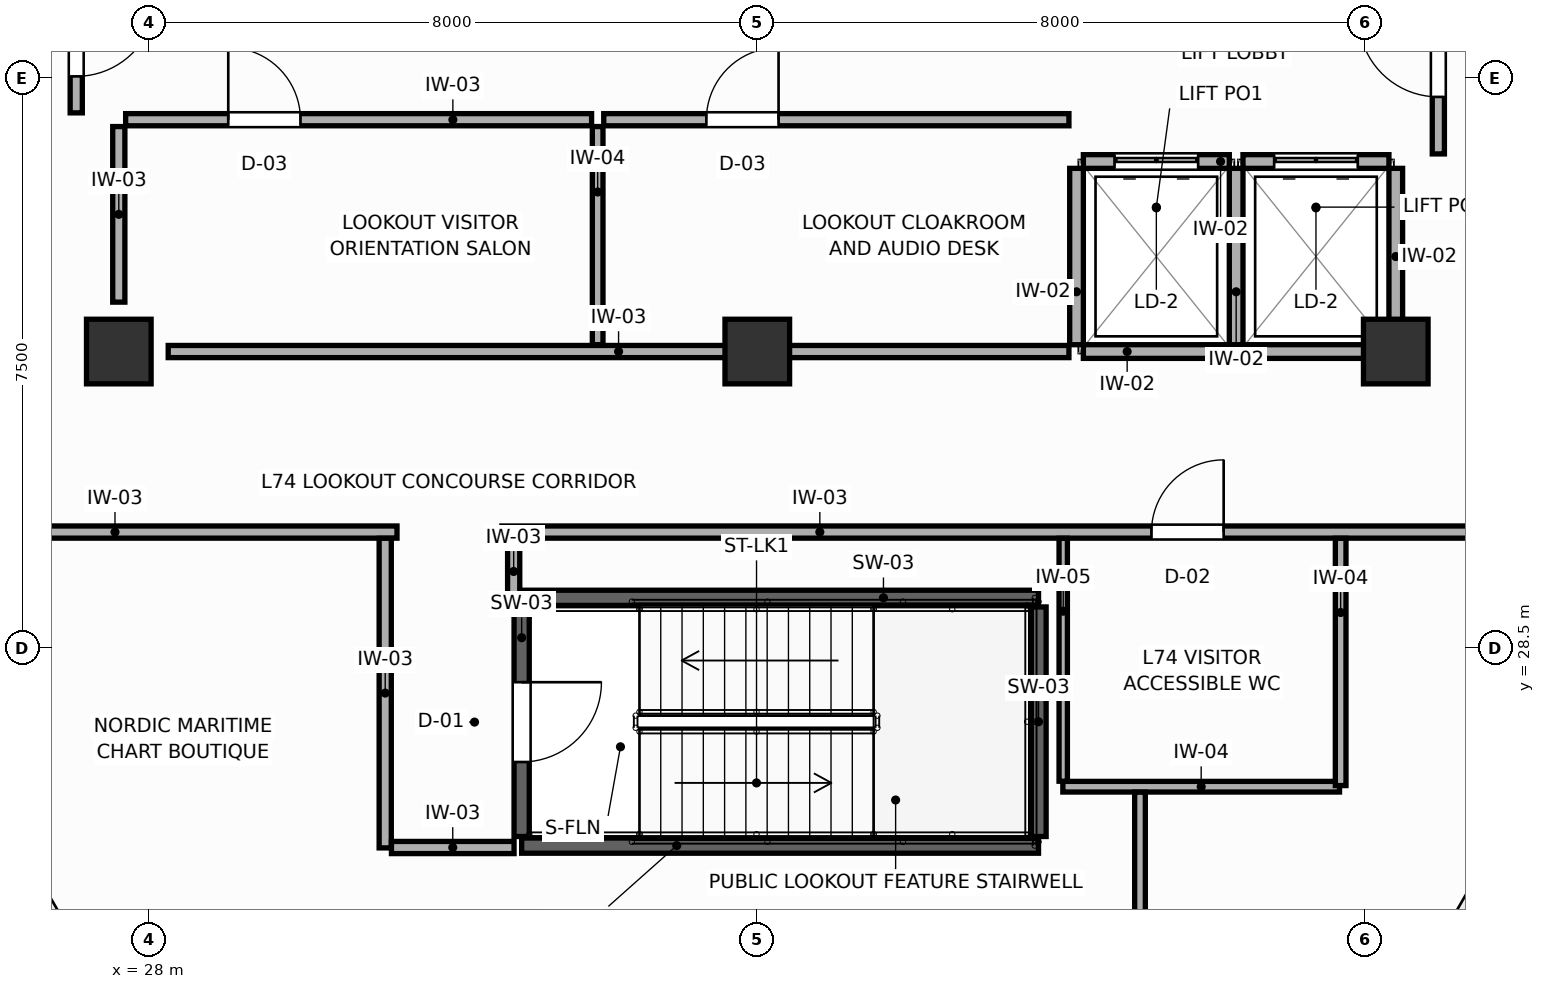
"""IFC4 building model, lengths in metres.
Left out: names, types, materials, properties, quantities, classifications, styles, units other than length and angle.
Written with IfcOpenShell. Run it as: python <this file> out.ifc"""

import sys

from ifc_helpers import new_model, si_unit, direction, frame, frame_2d, origin, origin_2d, place, context, subcontext, project, spatial, rectangle, extrude, source, transform, mapped, element, fill, save


model = new_model("IFC4")
c1 = context("Model", 3, precision=1e-05, world=origin(), true_north=direction((0.0, 1.0)))
c2 = subcontext(c1, "Body", "Model", "MODEL_VIEW")
j1 = project(units=[si_unit("LENGTHUNIT", "METRE"), si_unit("PLANEANGLEUNIT", "RADIAN")], contexts=[c1])
p1 = place(None, origin())
s1 = spatial("IfcSite", under=j1, at=p1, CompositionType="ELEMENT")
p2 = place(p1, origin())
s2 = spatial("IfcBuilding", under=s1, at=p2, CompositionType="ELEMENT")
p3 = place(p2, frame((0.0, 0.0, 283.8)))
s3 = spatial("IfcBuildingStorey", under=s2, at=p3, CompositionType="ELEMENT", Elevation=283.8)
m1 = source(origin(), c2, "Body", "SweptSolid", [
    extrude(rectangle(XDim=0.85, YDim=0.85, at=origin_2d()), origin(), (0.0, 0.0, 1.0), 4.2),
])
for number, where, z_axis, x_axis in (
    (1, (27.6, 32.4, 0.0), (0.0, 0.0, 1.0), (1.0, 0.0, 0.0)),
    (2, (44.4, 32.4, 0.0), (0.0, 0.0, 1.0), (1.0, 0.0, 0.0)),
    (3, (36.0, 32.4, 0.0), (0.0, 0.0, 1.0), (1.0, 0.0, 0.0)),
):
    element("IfcColumn", number, at=place(p3, frame(where, z_axis=z_axis, x_axis=x_axis)), inside=s3, PredefinedType="COLUMN", context=c2, shape_type="MappedRepresentation", body=[
        mapped(m1, transform((0.0, 0.0, 0.0), scale=1.0)),
    ])
for number, where, z_axis, x_axis in (
    (4, (32.9, 29.16, 0.0), (0.0, 0.0, 1.0), (1.0, 0.0, 0.0)),
    (5, (32.9, 25.9, 0.0), (0.0, 0.0, 1.0), (1.0, 0.0, 0.0)),
):
    element("IfcWall", number, at=place(p3, frame(where, z_axis=z_axis, x_axis=x_axis)), inside=s3, PredefinedType="SHEAR", context=c2, shape_type="SweptSolid", body=[
        extrude(rectangle(XDim=6.8, YDim=0.2, at=frame_2d((3.4, 0.0))), origin(), (0.0, 0.0, 1.0), 4.2),
    ])
p4 = place(p3, frame((39.7, 26.02, 0.0), z_axis=(0.0, 0.0, 1.0), x_axis=(0.0, 1.0, 0.0)))
e6 = element("IfcWall", 6, at=p4, inside=s3, PredefinedType="SHEAR", context=c2, shape_type="SweptSolid", body=[
    extrude(rectangle(XDim=3.02, YDim=0.2, at=frame_2d((1.51, 0.0))), origin(), (0.0, 0.0, 1.0), 4.2),
])
p5 = place(p3, frame((40.29, 34.9, 0.0), z_axis=(0.0, 0.0, 1.0), x_axis=(1.0, 0.0, 0.0)))
e7 = element("IfcWall", 7, at=p5, inside=s3, PredefinedType="PARTITIONING", context=c2, shape_type="SweptSolid", body=[
    extrude(rectangle(XDim=1.92, YDim=0.18, at=frame_2d((0.96, 0.0))), origin(), (0.0, 0.0, 1.0), 3.96),
])
p6 = place(p5, frame((0.41, 0.0, 0.0)))
e8 = element("IfcOpeningElement", 8, at=p6, cuts=e7, PredefinedType="OPENING", context=c2, shape_type="SweptSolid", body=[
    extrude(rectangle(XDim=1.1, YDim=2.1, at=frame_2d((0.55, 1.05))), frame((0.0, 0.1, 0.0), z_axis=(0.0, -1.0, 0.0), x_axis=(1.0, 0.0, 0.0)), (0.0, 0.0, 1.0), 0.2),
])
p7 = place(p3, frame((40.29, 32.4, 0.0), z_axis=(0.0, 0.0, 1.0), x_axis=(1.0, 0.0, 0.0)))
e9 = element("IfcWall", 9, at=p7, inside=s3, PredefinedType="PARTITIONING", context=c2, shape_type="SweptSolid", body=[
    extrude(rectangle(XDim=1.92, YDim=0.18, at=frame_2d((0.96, 0.0))), origin(), (0.0, 0.0, 1.0), 2.52),
])
p8 = place(p3, frame((40.2, 32.49, 0.0), z_axis=(0.0, 0.0, 1.0), x_axis=(0.0, 1.0, 0.0)))
e10 = element("IfcWall", 10, at=p8, inside=s3, PredefinedType="PARTITIONING", context=c2, shape_type="SweptSolid", body=[
    extrude(rectangle(XDim=2.32, YDim=0.18, at=frame_2d((1.16, 0.0))), origin(), (0.0, 0.0, 1.0), 3.96),
])
p9 = place(p3, frame((42.39, 34.9, 0.0), z_axis=(0.0, 0.0, 1.0), x_axis=(1.0, 0.0, 0.0)))
e11 = element("IfcWall", 11, at=p9, inside=s3, PredefinedType="PARTITIONING", context=c2, shape_type="SweptSolid", body=[
    extrude(rectangle(XDim=1.92, YDim=0.18, at=frame_2d((0.96, 0.0))), origin(), (0.0, 0.0, 1.0), 3.96),
])
p10 = place(p9, frame((0.41, 0.0, 0.0)))
e12 = element("IfcOpeningElement", 12, at=p10, cuts=e11, PredefinedType="OPENING", context=c2, shape_type="SweptSolid", body=[
    extrude(rectangle(XDim=1.1, YDim=2.1, at=frame_2d((0.55, 1.05))), frame((0.0, 0.1, 0.0), z_axis=(0.0, -1.0, 0.0), x_axis=(1.0, 0.0, 0.0)), (0.0, 0.0, 1.0), 0.2),
])
p11 = place(p3, frame((42.39, 32.4, 0.0), z_axis=(0.0, 0.0, 1.0), x_axis=(1.0, 0.0, 0.0)))
e13 = element("IfcWall", 13, at=p11, inside=s3, PredefinedType="PARTITIONING", context=c2, shape_type="SweptSolid", body=[
    extrude(rectangle(XDim=1.92, YDim=0.18, at=frame_2d((0.96, 0.0))), origin(), (0.0, 0.0, 1.0), 2.52),
])
for number, where, z_axis, x_axis in (
    (14, (42.3, 32.49, 0.0), (0.0, 0.0, 1.0), (0.0, 1.0, 0.0)),
    (15, (44.4, 32.49, 0.0), (0.0, 0.0, 1.0), (0.0, 1.0, 0.0)),
):
    element("IfcWall", number, at=place(p3, frame(where, z_axis=z_axis, x_axis=x_axis)), inside=s3, PredefinedType="PARTITIONING", context=c2, shape_type="SweptSolid", body=[
        extrude(rectangle(XDim=2.32, YDim=0.18, at=frame_2d((1.16, 0.0))), origin(), (0.0, 0.0, 1.0), 3.96),
    ])
p12 = place(p3, frame((28.25, 32.4, 0.0), z_axis=(0.0, 0.0, 1.0), x_axis=(1.0, 0.0, 0.0)))
e16 = element("IfcWall", 16, at=p12, inside=s3, PredefinedType="PARTITIONING", context=c2, shape_type="SweptSolid", body=[
    extrude(rectangle(XDim=11.85, YDim=0.16, at=frame_2d((5.925, 0.0))), origin(), (0.0, 0.0, 1.0), 2.52),
])
p13 = place(p3, frame((27.6, 33.05, 0.0), z_axis=(0.0, 0.0, 1.0), x_axis=(0.0, 1.0, 0.0)))
e17 = element("IfcWall", 17, at=p13, inside=s3, PredefinedType="PARTITIONING", context=c2, shape_type="SweptSolid", body=[
    extrude(rectangle(XDim=2.31, YDim=0.16, at=frame_2d((1.155, 0.0))), origin(), (0.0, 0.0, 1.0), 3.96),
])
p14 = place(p3, frame((33.9, 32.49, 0.0), z_axis=(0.0, 0.0, 1.0), x_axis=(0.0, 1.0, 0.0)))
e18 = element("IfcWall", 18, at=p14, inside=s3, PredefinedType="PARTITIONING", context=c2, shape_type="SweptSolid", body=[
    extrude(rectangle(XDim=2.87, YDim=0.14, at=frame_2d((1.435, 0.0))), origin(), (0.0, 0.0, 1.0), 3.96),
])
p15 = place(p3, frame((27.69, 35.45, 0.0), z_axis=(0.0, 0.0, 1.0), x_axis=(1.0, 0.0, 0.0)))
e19 = element("IfcWall", 19, at=p15, inside=s3, PredefinedType="PARTITIONING", context=c2, shape_type="SweptSolid", body=[
    extrude(rectangle(XDim=6.13, YDim=0.16, at=frame_2d((3.065, 0.0))), origin(), (0.0, 0.0, 1.0), 3.96),
])
p16 = place(p15, frame((1.35, 0.0, 0.0)))
e20 = element("IfcOpeningElement", 20, at=p16, cuts=e19, PredefinedType="OPENING", context=c2, shape_type="SweptSolid", body=[
    extrude(rectangle(XDim=0.95, YDim=2.05, at=frame_2d((0.475, 1.025))), frame((0.0, 0.09, 0.0), z_axis=(0.0, -1.0, 0.0), x_axis=(1.0, 0.0, 0.0)), (0.0, 0.0, 1.0), 0.18),
])
p17 = place(p3, frame((33.98, 35.45, 0.0), z_axis=(0.0, 0.0, 1.0), x_axis=(1.0, 0.0, 0.0)))
e21 = element("IfcWall", 21, at=p17, inside=s3, PredefinedType="PARTITIONING", context=c2, shape_type="SweptSolid", body=[
    extrude(rectangle(XDim=6.12, YDim=0.16, at=frame_2d((3.06, 0.0))), origin(), (0.0, 0.0, 1.0), 3.96),
])
p18 = place(p17, frame((1.35, 0.0, 0.0)))
e22 = element("IfcOpeningElement", 22, at=p18, cuts=e21, PredefinedType="OPENING", context=c2, shape_type="SweptSolid", body=[
    extrude(rectangle(XDim=0.95, YDim=2.05, at=frame_2d((0.475, 1.025))), frame((0.0, 0.09, 0.0), z_axis=(0.0, -1.0, 0.0), x_axis=(1.0, 0.0, 0.0)), (0.0, 0.0, 1.0), 0.18),
])
p19 = place(p3, frame((27.04, 35.54, 0.0), z_axis=(0.0, 0.0, 1.0), x_axis=(0.0, 1.0, 0.0)))
e23 = element("IfcWall", 23, at=p19, inside=s3, PredefinedType="PARTITIONING", context=c2, shape_type="SweptSolid", body=[
    extrude(rectangle(XDim=2.11, YDim=0.16, at=frame_2d((1.055, 0.0))), origin(), (0.0, 0.0, 1.0), 3.96),
])
p20 = place(p19, frame((0.48, 0.0, 0.0)))
e24 = element("IfcOpeningElement", 24, at=p20, cuts=e23, PredefinedType="OPENING", context=c2, shape_type="SweptSolid", body=[
    extrude(rectangle(XDim=1.05, YDim=2.1, at=frame_2d((0.525, 1.05))), frame((0.0, 0.09, 0.0), z_axis=(0.0, -1.0, 0.0), x_axis=(1.0, 0.0, 0.0)), (0.0, 0.0, 1.0), 0.18),
])
p21 = place(p3, frame((44.96, 35.0, 0.0), z_axis=(0.0, 0.0, 1.0), x_axis=(0.0, 1.0, 0.0)))
e25 = element("IfcWall", 25, at=p21, inside=s3, PredefinedType="PARTITIONING", context=c2, shape_type="SweptSolid", body=[
    extrude(rectangle(XDim=2.65, YDim=0.16, at=frame_2d((1.325, 0.0))), origin(), (0.0, 0.0, 1.0), 3.96),
])
p22 = place(p21, frame((0.75, 0.0, 0.0)))
e26 = element("IfcOpeningElement", 26, at=p22, cuts=e25, PredefinedType="OPENING", context=c2, shape_type="SweptSolid", body=[
    extrude(rectangle(XDim=1.05, YDim=2.1, at=frame_2d((0.525, 1.05))), frame((0.0, 0.09, 0.0), z_axis=(0.0, -1.0, 0.0), x_axis=(1.0, 0.0, 0.0)), (0.0, 0.0, 1.0), 0.18),
])
p23 = place(p3, frame((32.9, 26.02, 0.0), z_axis=(0.0, 0.0, 1.0), x_axis=(0.0, 1.0, 0.0)))
e27 = element("IfcWall", 27, at=p23, inside=s3, PredefinedType="SHEAR", context=c2, shape_type="SweptSolid", body=[
    extrude(rectangle(XDim=3.02, YDim=0.2, at=frame_2d((1.51, 0.0))), origin(), (0.0, 0.0, 1.0), 4.2),
])
p24 = place(p23, frame((0.98, 0.0, 0.0)))
e28 = element("IfcOpeningElement", 28, at=p24, cuts=e27, PredefinedType="OPENING", context=c2, shape_type="SweptSolid", body=[
    extrude(rectangle(XDim=1.05, YDim=2.1, at=frame_2d((0.525, 1.05))), frame((0.0, 0.11, 0.0), z_axis=(0.0, -1.0, 0.0), x_axis=(1.0, 0.0, 0.0)), (0.0, 0.0, 1.0), 0.22),
])
p25 = place(p3, frame((32.64, 30.025, 0.0), z_axis=(0.0, 0.0, 1.0), x_axis=(1.0, 0.0, 0.0)))
e29 = element("IfcWall", 29, at=p25, inside=s3, PredefinedType="PARTITIONING", context=c2, shape_type="SweptSolid", body=[
    extrude(rectangle(XDim=15.538, YDim=0.16, at=frame_2d((7.769, 0.0))), origin(), (0.0, 0.0, 1.0), 3.96),
])
p26 = place(p25, frame((8.546, 0.0, 0.0)))
e30 = element("IfcOpeningElement", 30, at=p26, cuts=e29, PredefinedType="OPENING", context=c2, shape_type="SweptSolid", body=[
    extrude(rectangle(XDim=0.95, YDim=2.05, at=frame_2d((0.475, 1.025))), frame((0.0, 0.09, 0.0), z_axis=(0.0, -1.0, 0.0), x_axis=(1.0, 0.0, 0.0)), (0.0, 0.0, 1.0), 0.18),
])
p27 = place(p25, frame((13.072, 0.0, 0.0)))
e31 = element("IfcOpeningElement", 31, at=p27, cuts=e29, PredefinedType="OPENING", context=c2, shape_type="SweptSolid", body=[
    extrude(rectangle(XDim=0.95, YDim=2.05, at=frame_2d((0.475, 1.025))), frame((0.0, 0.09, 0.0), z_axis=(0.0, -1.0, 0.0), x_axis=(1.0, 0.0, 0.0)), (0.0, 0.0, 1.0), 0.18),
])
p28 = place(p3, frame((23.84, 30.025, 0.0), z_axis=(0.0, 0.0, 1.0), x_axis=(1.0, 0.0, 0.0)))
e32 = element("IfcWall", 32, at=p28, inside=s3, PredefinedType="PARTITIONING", context=c2, shape_type="SweptSolid", body=[
    extrude(rectangle(XDim=7.42, YDim=0.16, at=frame_2d((3.71, 0.0))), origin(), (0.0, 0.0, 1.0), 3.96),
])
p29 = place(p3, frame((31.105, 25.87, 0.0), z_axis=(0.0, 0.0, 1.0), x_axis=(0.0, 1.0, 0.0)))
e33 = element("IfcWall", 33, at=p29, inside=s3, PredefinedType="PARTITIONING", context=c2, shape_type="SweptSolid", body=[
    extrude(rectangle(XDim=4.073, YDim=0.16, at=frame_2d((2.037, 0.0))), origin(), (0.0, 0.0, 1.0), 3.96),
])
p30 = place(p3, frame((31.187, 25.875, 0.0), z_axis=(0.0, 0.0, 1.0), x_axis=(1.0, 0.0, 0.0)))
e34 = element("IfcWall", 34, at=p30, inside=s3, PredefinedType="PARTITIONING", context=c2, shape_type="SweptSolid", body=[
    extrude(rectangle(XDim=1.613, YDim=0.16, at=frame_2d((0.807, 0.0))), origin(), (0.0, 0.0, 1.0), 3.96),
])
p31 = place(p3, frame((32.795, 29.07, 0.0), z_axis=(0.0, 0.0, 1.0), x_axis=(0.0, 1.0, 0.0)))
e35 = element("IfcWall", 35, at=p31, inside=s3, PredefinedType="PARTITIONING", context=c2, shape_type="SweptSolid", body=[
    extrude(rectangle(XDim=0.873, YDim=0.16, at=frame_2d((0.437, 0.0))), origin(), (0.0, 0.0, 1.0), 3.96),
])
p32 = place(p3, frame((40.02, 26.675, 0.0), z_axis=(0.0, 0.0, 1.0), x_axis=(1.0, 0.0, 0.0)))
e36 = element("IfcWall", 36, at=p32, inside=s3, PredefinedType="PARTITIONING", context=c2, shape_type="SweptSolid", body=[
    extrude(rectangle(XDim=3.64, YDim=0.14, at=frame_2d((1.82, 0.0))), origin(), (0.0, 0.0, 1.0), 3.96),
])
p33 = place(p3, frame((40.025, 26.747, 0.0), z_axis=(0.0, 0.0, 1.0), x_axis=(0.0, 1.0, 0.0)))
e37 = element("IfcWall", 37, at=p33, inside=s3, PredefinedType="MOVABLE", context=c2, shape_type="SweptSolid", body=[
    extrude(rectangle(XDim=3.196, YDim=0.11, at=frame_2d((1.598, 0.0))), origin(), (0.0, 0.0, 1.0), 3.96),
])
p34 = place(p3, frame((43.675, 26.69, 0.0), z_axis=(0.0, 0.0, 1.0), x_axis=(0.0, 1.0, 0.0)))
e38 = element("IfcWall", 38, at=p34, inside=s3, PredefinedType="PARTITIONING", context=c2, shape_type="SweptSolid", body=[
    extrude(rectangle(XDim=3.253, YDim=0.14, at=frame_2d((1.626, 0.0))), origin(), (0.0, 0.0, 1.0), 3.96),
])
p35 = place(p3, frame((41.035, 23.477, 0.0), z_axis=(0.0, 0.0, 1.0), x_axis=(0.0, 1.0, 0.0)))
e39 = element("IfcWall", 39, at=p35, inside=s3, PredefinedType="PARTITIONING", context=c2, shape_type="SweptSolid", body=[
    extrude(rectangle(XDim=3.126, YDim=0.14, at=frame_2d((1.563, 0.0))), origin(), (0.0, 0.0, 1.0), 3.96),
])
p36 = place(p6, origin())
e40 = element("IfcDoor", 40, at=p36, inside=s3, OperationType="DOUBLE_DOOR_SLIDING", PredefinedType="DOOR", context=c2, shape_type="SweptSolid", body=[
    extrude(rectangle(XDim=1.1, YDim=2.1, at=frame_2d((0.55, 1.05))), frame((0.0, 0.025, 0.0), z_axis=(0.0, -1.0, 0.0), x_axis=(1.0, 0.0, 0.0)), (0.0, 0.0, 1.0), 0.05),
])
fill(e8, e40)
p37 = place(p10, origin())
e41 = element("IfcDoor", 41, at=p37, inside=s3, OperationType="DOUBLE_DOOR_SLIDING", PredefinedType="DOOR", context=c2, shape_type="SweptSolid", body=[
    extrude(rectangle(XDim=1.1, YDim=2.1, at=frame_2d((0.55, 1.05))), frame((0.0, 0.025, 0.0), z_axis=(0.0, -1.0, 0.0), x_axis=(1.0, 0.0, 0.0)), (0.0, 0.0, 1.0), 0.05),
])
fill(e12, e41)
p38 = place(p16, origin())
e42 = element("IfcDoor", 42, at=p38, inside=s3, OperationType="SINGLE_SWING_LEFT", PredefinedType="DOOR", context=c2, shape_type="SweptSolid", body=[
    extrude(rectangle(XDim=0.95, YDim=2.05, at=frame_2d((0.475, 1.025))), frame((0.0, 0.025, 0.0), z_axis=(0.0, -1.0, 0.0), x_axis=(1.0, 0.0, 0.0)), (0.0, 0.0, 1.0), 0.05),
])
fill(e20, e42)
p39 = place(p18, origin())
e43 = element("IfcDoor", 43, at=p39, inside=s3, OperationType="SINGLE_SWING_RIGHT", PredefinedType="DOOR", context=c2, shape_type="SweptSolid", body=[
    extrude(rectangle(XDim=0.95, YDim=2.05, at=frame_2d((0.475, 1.025))), frame((0.0, 0.025, 0.0), z_axis=(0.0, -1.0, 0.0), x_axis=(1.0, 0.0, 0.0)), (0.0, 0.0, 1.0), 0.05),
])
fill(e22, e43)
p40 = place(p20, frame((1.05, 0.0, 0.0), z_axis=(0.0, 0.0, 1.0), x_axis=(-1.0, 0.0, 0.0)))
e44 = element("IfcDoor", 44, at=p40, inside=s3, OperationType="SINGLE_SWING_LEFT", PredefinedType="DOOR", context=c2, shape_type="SweptSolid", body=[
    extrude(rectangle(XDim=1.05, YDim=2.1, at=frame_2d((0.525, 1.05))), frame((0.0, 0.025, 0.0), z_axis=(0.0, -1.0, 0.0), x_axis=(1.0, 0.0, 0.0)), (0.0, 0.0, 1.0), 0.05),
])
fill(e24, e44)
p41 = place(p22, origin())
e45 = element("IfcDoor", 45, at=p41, inside=s3, OperationType="SINGLE_SWING_RIGHT", PredefinedType="DOOR", context=c2, shape_type="SweptSolid", body=[
    extrude(rectangle(XDim=1.05, YDim=2.1, at=frame_2d((0.525, 1.05))), frame((0.0, 0.025, 0.0), z_axis=(0.0, -1.0, 0.0), x_axis=(1.0, 0.0, 0.0)), (0.0, 0.0, 1.0), 0.05),
])
fill(e26, e45)
p42 = place(p24, frame((1.05, 0.0, 0.0), z_axis=(0.0, 0.0, 1.0), x_axis=(-1.0, 0.0, 0.0)))
e46 = element("IfcDoor", 46, at=p42, inside=s3, OperationType="SINGLE_SWING_LEFT", PredefinedType="DOOR", context=c2, shape_type="SweptSolid", body=[
    extrude(rectangle(XDim=1.05, YDim=2.1, at=frame_2d((0.525, 1.05))), frame((0.0, 0.025, 0.0), z_axis=(0.0, -1.0, 0.0), x_axis=(1.0, 0.0, 0.0)), (0.0, 0.0, 1.0), 0.05),
])
fill(e28, e46)
p43 = place(p26, origin())
e47 = element("IfcDoor", 47, at=p43, inside=s3, OperationType="SINGLE_SWING_RIGHT", PredefinedType="DOOR", context=c2, shape_type="SweptSolid", body=[
    extrude(rectangle(XDim=0.95, YDim=2.05, at=frame_2d((0.475, 1.025))), frame((0.0, 0.025, 0.0), z_axis=(0.0, -1.0, 0.0), x_axis=(1.0, 0.0, 0.0)), (0.0, 0.0, 1.0), 0.05),
])
fill(e30, e47)
save(model, sys.argv[1])
